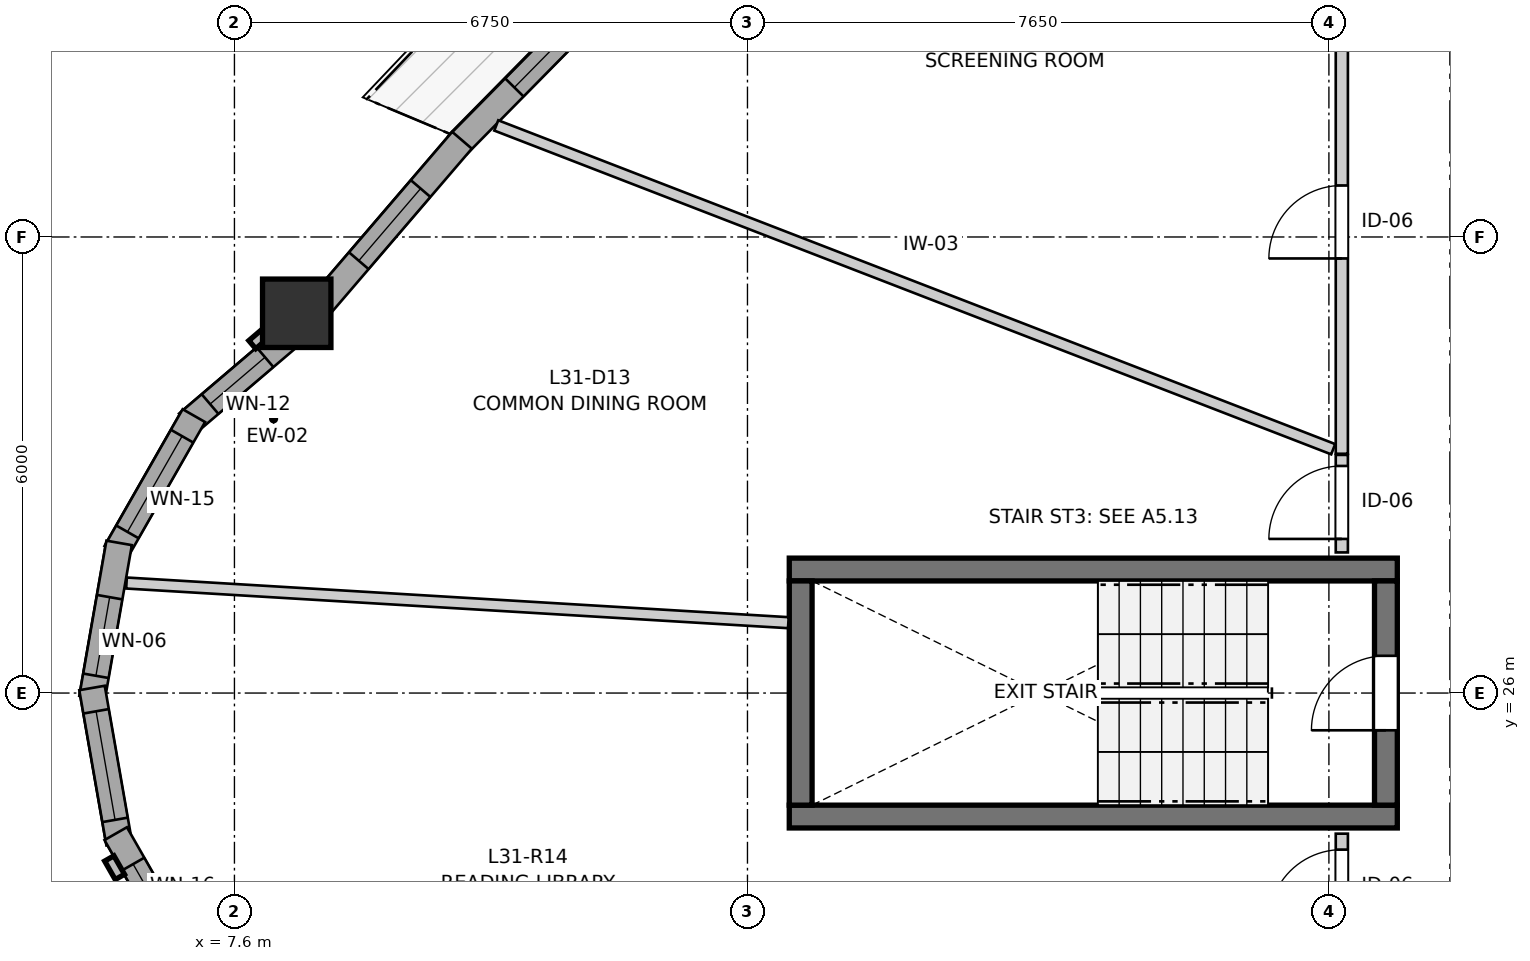
"""IFC4 building model, lengths in metres.
Left out: names, types, materials, properties, quantities, classifications, styles, units other than length and angle.
Written with IfcOpenShell. Run it as: python <this file> out.ifc"""

import sys

from ifc_helpers import new_model, si_unit, direction, frame, frame_2d, origin, origin_2d, place, context, subcontext, project, spatial, rectangle, extrude, source, transform, mapped, element, fill, save


model = new_model("IFC4")
c1 = context("Model", 3, precision=1e-05, world=origin(), true_north=direction((0.0, 1.0)))
c2 = subcontext(c1, "Body", "Model", "MODEL_VIEW")
j1 = project(units=[si_unit("LENGTHUNIT", "METRE"), si_unit("PLANEANGLEUNIT", "RADIAN")], contexts=[c1])
p1 = place(None, origin())
s1 = spatial("IfcSite", under=j1, at=p1, CompositionType="ELEMENT")
p2 = place(p1, origin())
s2 = spatial("IfcBuilding", under=s1, at=p2, CompositionType="ELEMENT")
p3 = place(p2, frame((0.0, 0.0, 105.6)))
s3 = spatial("IfcBuildingStorey", under=s2, at=p3, CompositionType="ELEMENT", Elevation=105.6)
for number, where, z_axis, x_axis in (
    (1, (14.9, 24.375, 0.0), (0.0, 0.0, 1.0), (1.0, 0.0, 0.0)),
    (2, (22.9, 27.625, 0.0), (0.0, 0.0, 1.0), (-1.0, 0.0, 0.0)),
):
    element("IfcWall", number, at=place(p3, frame(where, z_axis=z_axis, x_axis=x_axis)), inside=s3, PredefinedType="SHEAR", context=c2, shape_type="SweptSolid", body=[
        extrude(rectangle(XDim=8.0, YDim=0.3, at=frame_2d((4.0, 0.0))), origin(), (0.0, 0.0, 1.0), 2.935),
    ])
p4 = place(p3, frame((15.05, 27.475, 0.0), z_axis=(0.0, 0.0, 1.0), x_axis=(0.0, -1.0, 0.0)))
e3 = element("IfcWall", 3, at=p4, inside=s3, PredefinedType="SHEAR", context=c2, shape_type="SweptSolid", body=[
    extrude(rectangle(XDim=2.95, YDim=0.3, at=frame_2d((1.475, 0.0))), origin(), (0.0, 0.0, 1.0), 2.935),
])
p5 = place(p3, frame((22.75, 24.525, 0.0), z_axis=(0.0, 0.0, 1.0), x_axis=(0.0, 1.0, 0.0)))
e4 = element("IfcWall", 4, at=p5, inside=s3, PredefinedType="SHEAR", context=c2, shape_type="SweptSolid", body=[
    extrude(rectangle(XDim=2.95, YDim=0.3, at=frame_2d((1.475, 0.0))), origin(), (0.0, 0.0, 1.0), 2.935),
])
p6 = place(p5, frame((0.985, 0.0, 0.0)))
e5 = element("IfcOpeningElement", 5, at=p6, cuts=e4, PredefinedType="OPENING", context=c2, shape_type="SweptSolid", body=[
    extrude(rectangle(XDim=0.98, YDim=2.15, at=frame_2d((0.49, 1.075))), frame((0.0, 0.16, 0.0), z_axis=(0.0, -1.0, 0.0), x_axis=(1.0, 0.0, 0.0)), (0.0, 0.0, 1.0), 0.32),
])
m1 = source(origin(), c2, "Body", "SweptSolid", [
    extrude(rectangle(XDim=0.9, YDim=0.9, at=origin_2d()), origin(), (0.0, 0.0, 1.0), 2.935),
])
p7 = place(p3, frame((8.419, 30.996, 0.0), z_axis=(0.0, 0.0, 1.0), x_axis=(1.0, 0.0, 0.0)))
e6 = element("IfcColumn", 6, at=p7, inside=s3, PredefinedType="COLUMN", context=c2, shape_type="MappedRepresentation", body=[
    mapped(m1, transform((0.0, 0.0, 0.0), x_axis=(1.0, 0.0, 0.0), y_axis=(0.0, 1.0, 0.0), z_axis=(0.0, 0.0, 1.0), scale=1.0)),
])
p8 = place(p3, frame((8.355, 30.718, 0.0), z_axis=(0.0, 0.0, 1.0), x_axis=(-0.761134405886, -0.648594184507, 0.0)))
e7 = element("IfcWall", 7, at=p8, inside=s3, PredefinedType="SOLIDWALL", context=c2, shape_type="SweptSolid", body=[
    extrude(rectangle(XDim=1.805, YDim=0.34, at=frame_2d((0.902, 0.0))), origin(), (0.0, 0.0, 1.0), 2.465),
])
p9 = place(p8, frame((0.462, 0.0, 0.82)))
e8 = element("IfcOpeningElement", 8, at=p9, cuts=e7, PredefinedType="OPENING", context=c2, shape_type="SweptSolid", body=[
    extrude(rectangle(XDim=0.95, YDim=1.35, at=frame_2d((0.475, 0.675))), frame((0.0, 0.18, 0.0), z_axis=(0.0, -1.0, 0.0), x_axis=(1.0, 0.0, 0.0)), (0.0, 0.0, 1.0), 0.36),
])
p10 = place(p3, frame((7.066, 29.65, 0.0), z_axis=(0.0, 0.0, 1.0), x_axis=(-0.496037473582, -0.868301114132, 0.0)))
e9 = element("IfcWall", 9, at=p10, inside=s3, PredefinedType="SOLIDWALL", context=c2, shape_type="SweptSolid", body=[
    extrude(rectangle(XDim=2.073, YDim=0.34, at=frame_2d((1.037, 0.0))), origin(), (0.0, 0.0, 1.0), 2.465),
])
p11 = place(p10, frame((0.312, 0.0, 0.82)))
e10 = element("IfcOpeningElement", 10, at=p11, cuts=e9, PredefinedType="OPENING", context=c2, shape_type="SweptSolid", body=[
    extrude(rectangle(XDim=1.45, YDim=1.25, at=frame_2d((0.725, 0.625))), frame((0.0, 0.18, 0.0), z_axis=(0.0, -1.0, 0.0), x_axis=(1.0, 0.0, 0.0)), (0.0, 0.0, 1.0), 0.36),
])
p12 = place(p3, frame((6.083, 27.975, 0.0), z_axis=(0.0, 0.0, 1.0), x_axis=(-0.172186061474, -0.985064444711, 0.0)))
e11 = element("IfcWall", 11, at=p12, inside=s3, PredefinedType="SOLIDWALL", context=c2, shape_type="SweptSolid", body=[
    extrude(rectangle(XDim=2.073, YDim=0.34, at=frame_2d((1.037, 0.0))), origin(), (0.0, 0.0, 1.0), 2.465),
])
p13 = place(p12, frame((0.725, 0.0, 0.82)))
e12 = element("IfcOpeningElement", 12, at=p13, cuts=e11, PredefinedType="OPENING", context=c2, shape_type="SweptSolid", body=[
    extrude(rectangle(XDim=1.05, YDim=1.45, at=frame_2d((0.525, 0.725))), frame((0.0, 0.18, 0.0), z_axis=(0.0, -1.0, 0.0), x_axis=(1.0, 0.0, 0.0)), (0.0, 0.0, 1.0), 0.36),
])
p14 = place(p3, frame((5.726, 26.067, 0.0), z_axis=(0.0, 0.0, 1.0), x_axis=(0.172186061474, -0.985064444711, 0.0)))
e13 = element("IfcWall", 13, at=p14, inside=s3, PredefinedType="SOLIDWALL", context=c2, shape_type="SweptSolid", body=[
    extrude(rectangle(XDim=2.073, YDim=0.34, at=frame_2d((1.037, 0.0))), origin(), (0.0, 0.0, 1.0), 2.465),
])
p15 = place(p14, frame((0.312, 0.0, 0.82)))
e14 = element("IfcOpeningElement", 14, at=p15, cuts=e13, PredefinedType="OPENING", context=c2, shape_type="SweptSolid", body=[
    extrude(rectangle(XDim=1.45, YDim=1.25, at=frame_2d((0.725, 0.625))), frame((0.0, 0.18, 0.0), z_axis=(0.0, -1.0, 0.0), x_axis=(1.0, 0.0, 0.0)), (0.0, 0.0, 1.0), 0.36),
])
p16 = place(p3, frame((6.038, 24.15, 0.0), z_axis=(0.0, 0.0, 1.0), x_axis=(0.496037473582, -0.868301114132, 0.0)))
e15 = element("IfcWall", 15, at=p16, inside=s3, PredefinedType="SOLIDWALL", context=c2, shape_type="SweptSolid", body=[
    extrude(rectangle(XDim=2.073, YDim=0.34, at=frame_2d((1.037, 0.0))), origin(), (0.0, 0.0, 1.0), 2.465),
])
p17 = place(p16, frame((0.461, 0.0, 0.82)))
e16 = element("IfcOpeningElement", 16, at=p17, cuts=e15, PredefinedType="OPENING", context=c2, shape_type="SweptSolid", body=[
    extrude(rectangle(XDim=1.15, YDim=1.2, at=frame_2d((0.575, 0.6))), frame((0.0, 0.18, 0.0), z_axis=(0.0, -1.0, 0.0), x_axis=(1.0, 0.0, 0.0)), (0.0, 0.0, 1.0), 0.36),
])
p18 = place(p3, frame((12.682, 35.386, 0.0), z_axis=(0.0, 0.0, 1.0), x_axis=(-0.701899134886, -0.712276353985, 0.0)))
e17 = element("IfcWall", 17, at=p18, inside=s3, PredefinedType="SOLIDWALL", context=c2, shape_type="SweptSolid", body=[
    extrude(rectangle(XDim=3.058, YDim=0.34, at=frame_2d((1.529, 0.0))), origin(), (0.0, 0.0, 1.0), 2.465),
])
p19 = place(p18, frame((0.593, 0.0, 0.82)))
e18 = element("IfcOpeningElement", 18, at=p19, cuts=e17, PredefinedType="OPENING", context=c2, shape_type="SweptSolid", body=[
    extrude(rectangle(XDim=1.4, YDim=1.35, at=frame_2d((0.7, 0.675))), frame((0.0, 0.18, 0.0), z_axis=(0.0, -1.0, 0.0), x_axis=(1.0, 0.0, 0.0)), (0.0, 0.0, 1.0), 0.36),
])
p20 = place(p3, frame((10.594, 33.272, 0.0), z_axis=(0.0, 0.0, 1.0), x_axis=(-0.650763769467, -0.759280262057, 0.0)))
e19 = element("IfcWall", 19, at=p20, inside=s3, PredefinedType="SOLIDWALL", context=c2, shape_type="SweptSolid", body=[
    extrude(rectangle(XDim=2.914, YDim=0.34, at=frame_2d((1.457, 0.0))), origin(), (0.0, 0.0, 1.0), 2.465),
])
p21 = place(p20, frame((0.837, 0.0, 0.82)))
e20 = element("IfcOpeningElement", 20, at=p21, cuts=e19, PredefinedType="OPENING", context=c2, shape_type="SweptSolid", body=[
    extrude(rectangle(XDim=1.25, YDim=1.35, at=frame_2d((0.625, 0.675))), frame((0.0, 0.18, 0.0), z_axis=(0.0, -1.0, 0.0), x_axis=(1.0, 0.0, 0.0)), (0.0, 0.0, 1.0), 0.36),
])
p22 = place(p3, frame((22.17, 29.148, 0.0), z_axis=(0.0, 0.0, 1.0), x_axis=(0.0, 1.0, 0.0)))
e21 = element("IfcWall", 21, at=p22, inside=s3, PredefinedType="PARTITIONING", context=c2, shape_type="SweptSolid", body=[
    extrude(rectangle(XDim=6.106, YDim=0.16, at=frame_2d((3.053, 0.0))), origin(), (0.0, 0.0, 1.0), 2.935),
])
p23 = place(p22, frame((2.57, 0.0, 0.0)))
e22 = element("IfcOpeningElement", 22, at=p23, cuts=e21, PredefinedType="OPENING", context=c2, shape_type="SweptSolid", body=[
    extrude(rectangle(XDim=0.96, YDim=2.1, at=frame_2d((0.48, 1.05))), frame((0.0, 0.09, 0.0), z_axis=(0.0, -1.0, 0.0), x_axis=(1.0, 0.0, 0.0)), (0.0, 0.0, 1.0), 0.18),
])
p24 = place(p3, frame((22.17, 22.726, 0.0), z_axis=(0.0, 0.0, 1.0), x_axis=(0.0, 1.0, 0.0)))
e23 = element("IfcWall", 23, at=p24, inside=s3, PredefinedType="PARTITIONING", context=c2, shape_type="SweptSolid", body=[
    extrude(rectangle(XDim=1.424, YDim=0.16, at=frame_2d((0.712, 0.0))), origin(), (0.0, 0.0, 1.0), 2.935),
])
p25 = place(p24, frame((0.254, 0.0, 0.0)))
e24 = element("IfcOpeningElement", 24, at=p25, cuts=e23, PredefinedType="OPENING", context=c2, shape_type="SweptSolid", body=[
    extrude(rectangle(XDim=0.96, YDim=2.1, at=frame_2d((0.48, 1.05))), frame((0.0, 0.09, 0.0), z_axis=(0.0, -1.0, 0.0), x_axis=(1.0, 0.0, 0.0)), (0.0, 0.0, 1.0), 0.18),
])
p26 = place(p3, frame((22.17, 27.85, 0.0), z_axis=(0.0, 0.0, 1.0), x_axis=(0.0, 1.0, 0.0)))
e25 = element("IfcWall", 25, at=p26, inside=s3, PredefinedType="PARTITIONING", context=c2, shape_type="SweptSolid", body=[
    extrude(rectangle(XDim=1.283, YDim=0.16, at=frame_2d((0.642, 0.0))), origin(), (0.0, 0.0, 1.0), 2.935),
])
p27 = place(p26, frame((0.177, 0.0, 0.0)))
e26 = element("IfcOpeningElement", 26, at=p27, cuts=e25, PredefinedType="OPENING", context=c2, shape_type="SweptSolid", body=[
    extrude(rectangle(XDim=0.96, YDim=2.1, at=frame_2d((0.48, 1.05))), frame((0.0, 0.09, 0.0), z_axis=(0.0, -1.0, 0.0), x_axis=(1.0, 0.0, 0.0)), (0.0, 0.0, 1.0), 0.18),
])
p28 = place(p3, frame((11.045, 33.468, 0.0), z_axis=(0.0, 0.0, 1.0), x_axis=(0.932653180854, -0.360774228906, 0.0)))
e27 = element("IfcWall", 27, at=p28, inside=s3, PredefinedType="PARTITIONING", context=c2, shape_type="SweptSolid", body=[
    extrude(rectangle(XDim=11.807, YDim=0.145, at=frame_2d((5.903, 0.0))), origin(), (0.0, 0.0, 1.0), 2.935),
])
p29 = place(p3, frame((6.18, 27.448, 0.0), z_axis=(0.0, 0.0, 1.0), x_axis=(0.998209995059, -0.059806402362, 0.0)))
e28 = element("IfcWall", 28, at=p29, inside=s3, PredefinedType="PARTITIONING", context=c2, shape_type="SweptSolid", body=[
    extrude(rectangle(XDim=8.724, YDim=0.145, at=frame_2d((4.362, 0.0))), origin(), (0.0, 0.0, 1.0), 2.935),
])
m2 = source(origin(), c2, "Body", "SweptSolid", [
    extrude(rectangle(XDim=0.95, YDim=1.35, at=frame_2d((0.475, 0.675))), frame((0.0, 0.03, 0.0), z_axis=(0.0, -1.0, 0.0), x_axis=(1.0, 0.0, 0.0)), (0.0, 0.0, 1.0), 0.06),
])
p30 = place(p9, origin())
e29 = element("IfcWindow", 29, at=p30, inside=s3, PartitioningType="SINGLE_PANEL", PredefinedType="WINDOW", context=c2, shape_type="MappedRepresentation", body=[
    mapped(m2, transform((0.0, 0.0, 0.0), x_axis=(1.0, 0.0, 0.0), y_axis=(0.0, 1.0, 0.0), z_axis=(0.0, 0.0, 1.0), scale=1.0)),
])
fill(e8, e29)
m3 = source(origin(), c2, "Body", "SweptSolid", [
    extrude(rectangle(XDim=1.45, YDim=1.25, at=frame_2d((0.725, 0.625))), frame((0.0, 0.03, 0.0), z_axis=(0.0, -1.0, 0.0), x_axis=(1.0, 0.0, 0.0)), (0.0, 0.0, 1.0), 0.06),
])
p31 = place(p11, origin())
e30 = element("IfcWindow", 30, at=p31, inside=s3, PartitioningType="SINGLE_PANEL", PredefinedType="WINDOW", context=c2, shape_type="MappedRepresentation", body=[
    mapped(m3, transform((0.0, 0.0, 0.0), x_axis=(1.0, 0.0, 0.0), y_axis=(0.0, 1.0, 0.0), z_axis=(0.0, 0.0, 1.0), scale=1.0)),
])
fill(e10, e30)
m4 = source(origin(), c2, "Body", "SweptSolid", [
    extrude(rectangle(XDim=1.05, YDim=1.45, at=frame_2d((0.525, 0.725))), frame((0.0, 0.03, 0.0), z_axis=(0.0, -1.0, 0.0), x_axis=(1.0, 0.0, 0.0)), (0.0, 0.0, 1.0), 0.06),
])
p32 = place(p13, origin())
e31 = element("IfcWindow", 31, at=p32, inside=s3, PartitioningType="SINGLE_PANEL", PredefinedType="WINDOW", context=c2, shape_type="MappedRepresentation", body=[
    mapped(m4, transform((0.0, 0.0, 0.0), x_axis=(1.0, 0.0, 0.0), y_axis=(0.0, 1.0, 0.0), z_axis=(0.0, 0.0, 1.0), scale=1.0)),
])
fill(e12, e31)
p33 = place(p15, origin())
e32 = element("IfcWindow", 32, at=p33, inside=s3, PartitioningType="SINGLE_PANEL", PredefinedType="WINDOW", context=c2, shape_type="MappedRepresentation", body=[
    mapped(m3, transform((0.0, 0.0, 0.0), x_axis=(1.0, 0.0, 0.0), y_axis=(0.0, 1.0, 0.0), z_axis=(0.0, 0.0, 1.0), scale=1.0)),
])
fill(e14, e32)
m5 = source(origin(), c2, "Body", "SweptSolid", [
    extrude(rectangle(XDim=1.15, YDim=1.2, at=frame_2d((0.575, 0.6))), frame((0.0, 0.03, 0.0), z_axis=(0.0, -1.0, 0.0), x_axis=(1.0, 0.0, 0.0)), (0.0, 0.0, 1.0), 0.06),
])
p34 = place(p17, origin())
e33 = element("IfcWindow", 33, at=p34, inside=s3, PartitioningType="SINGLE_PANEL", PredefinedType="WINDOW", context=c2, shape_type="MappedRepresentation", body=[
    mapped(m5, transform((0.0, 0.0, 0.0), x_axis=(1.0, 0.0, 0.0), y_axis=(0.0, 1.0, 0.0), z_axis=(0.0, 0.0, 1.0), scale=1.0)),
])
fill(e16, e33)
m6 = source(origin(), c2, "Body", "SweptSolid", [
    extrude(rectangle(XDim=1.4, YDim=1.35, at=frame_2d((0.7, 0.675))), frame((0.0, 0.03, 0.0), z_axis=(0.0, -1.0, 0.0), x_axis=(1.0, 0.0, 0.0)), (0.0, 0.0, 1.0), 0.06),
])
p35 = place(p19, origin())
e34 = element("IfcWindow", 34, at=p35, inside=s3, PartitioningType="SINGLE_PANEL", PredefinedType="WINDOW", context=c2, shape_type="MappedRepresentation", body=[
    mapped(m6, transform((0.0, 0.0, 0.0), x_axis=(1.0, 0.0, 0.0), y_axis=(0.0, 1.0, 0.0), z_axis=(0.0, 0.0, 1.0), scale=1.0)),
])
fill(e18, e34)
m7 = source(origin(), c2, "Body", "SweptSolid", [
    extrude(rectangle(XDim=1.25, YDim=1.35, at=frame_2d((0.625, 0.675))), frame((0.0, 0.03, 0.0), z_axis=(0.0, -1.0, 0.0), x_axis=(1.0, 0.0, 0.0)), (0.0, 0.0, 1.0), 0.06),
])
p36 = place(p21, origin())
e35 = element("IfcWindow", 35, at=p36, inside=s3, PartitioningType="SINGLE_PANEL", PredefinedType="WINDOW", context=c2, shape_type="MappedRepresentation", body=[
    mapped(m7, transform((0.0, 0.0, 0.0), x_axis=(1.0, 0.0, 0.0), y_axis=(0.0, 1.0, 0.0), z_axis=(0.0, 0.0, 1.0), scale=1.0)),
])
fill(e20, e35)
m8 = source(origin(), c2, "Body", "SweptSolid", [
    extrude(rectangle(XDim=0.98, YDim=2.15, at=frame_2d((0.49, 1.075))), frame((0.0, 0.025, 0.0), z_axis=(0.0, -1.0, 0.0), x_axis=(1.0, 0.0, 0.0)), (0.0, 0.0, 1.0), 0.05),
])
p37 = place(p6, origin())
e36 = element("IfcDoor", 36, at=p37, inside=s3, OperationType="SINGLE_SWING_LEFT", PredefinedType="DOOR", context=c2, shape_type="MappedRepresentation", body=[
    mapped(m8, transform((0.0, 0.0, 0.0), x_axis=(1.0, 0.0, 0.0), y_axis=(0.0, 1.0, 0.0), z_axis=(0.0, 0.0, 1.0), scale=1.0)),
])
fill(e5, e36)
m9 = source(origin(), c2, "Body", "SweptSolid", [
    extrude(rectangle(XDim=0.96, YDim=2.1, at=frame_2d((0.48, 1.05))), frame((0.0, 0.025, 0.0), z_axis=(0.0, -1.0, 0.0), x_axis=(1.0, 0.0, 0.0)), (0.0, 0.0, 1.0), 0.05),
])
p38 = place(p23, origin())
e37 = element("IfcDoor", 37, at=p38, inside=s3, OperationType="SINGLE_SWING_LEFT", PredefinedType="DOOR", context=c2, shape_type="MappedRepresentation", body=[
    mapped(m9, transform((0.0, 0.0, 0.0), x_axis=(1.0, 0.0, 0.0), y_axis=(0.0, 1.0, 0.0), z_axis=(0.0, 0.0, 1.0), scale=1.0)),
])
fill(e22, e37)
p39 = place(p25, origin())
e38 = element("IfcDoor", 38, at=p39, inside=s3, OperationType="SINGLE_SWING_LEFT", PredefinedType="DOOR", context=c2, shape_type="MappedRepresentation", body=[
    mapped(m9, transform((0.0, 0.0, 0.0), x_axis=(1.0, 0.0, 0.0), y_axis=(0.0, 1.0, 0.0), z_axis=(0.0, 0.0, 1.0), scale=1.0)),
])
fill(e24, e38)
p40 = place(p27, origin())
e39 = element("IfcDoor", 39, at=p40, inside=s3, OperationType="SINGLE_SWING_LEFT", PredefinedType="DOOR", context=c2, shape_type="MappedRepresentation", body=[
    mapped(m9, transform((0.0, 0.0, 0.0), x_axis=(1.0, 0.0, 0.0), y_axis=(0.0, 1.0, 0.0), z_axis=(0.0, 0.0, 1.0), scale=1.0)),
])
fill(e26, e39)
save(model, sys.argv[1])
